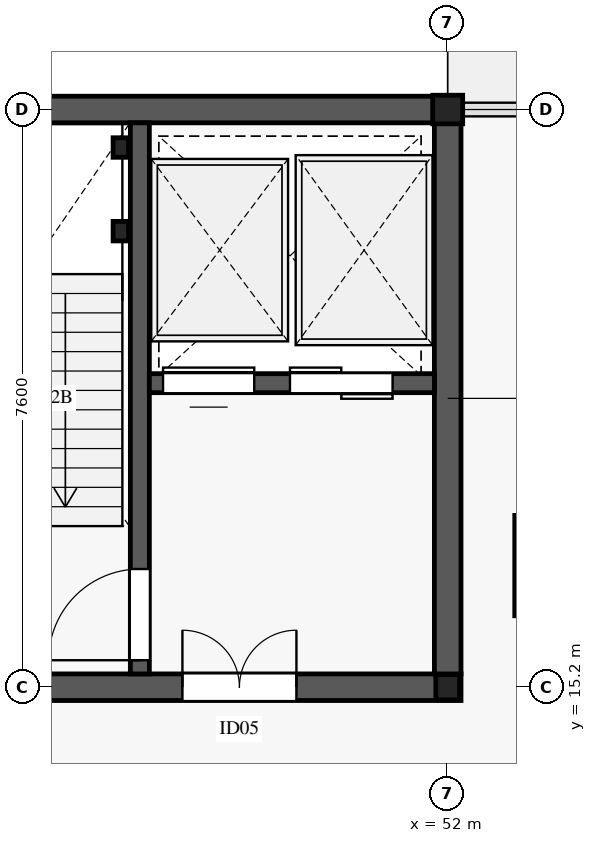
"""IFC4 building model, lengths in metres.
Left out: names, types, materials, properties, quantities, classifications, styles, units other than length and angle.
Written with IfcOpenShell. Run it as: python <this file> out.ifc"""

import sys

from ifc_helpers import new_model, si_unit, direction, frame, frame_2d, origin, origin_2d, place, context, subcontext, project, spatial, rectangle, i_section, extrude, element, fill, save


model = new_model("IFC4")
c1 = context("Model", 3, precision=1e-05, world=origin(), true_north=direction((0.0, 1.0)))
c2 = subcontext(c1, "Body", "Model", "MODEL_VIEW")
j1 = project(units=[si_unit("LENGTHUNIT", "METRE"), si_unit("PLANEANGLEUNIT", "RADIAN")], contexts=[c1])
p1 = place(None, origin())
s1 = spatial("IfcSite", under=j1, at=p1, CompositionType="ELEMENT")
p2 = place(p1, origin())
s2 = spatial("IfcBuilding", under=s1, at=p2, CompositionType="ELEMENT")
p3 = place(p2, frame((0.0, 0.0, 20.4)))
s3 = spatial("IfcBuildingStorey", under=s2, at=p3, CompositionType="ELEMENT", Elevation=20.4)
p4 = place(p3, frame((52.0, 15.2, 0.0), z_axis=(0.0, 0.0, 1.0), x_axis=(1.0, 0.0, 0.0)))
e1 = element("IfcColumn", 1, at=p4, inside=s3, PredefinedType="COLUMN", context=c2, shape_type="SweptSolid", body=[
    extrude(i_section(OverallWidth=0.313, OverallDepth=0.333, WebThickness=0.018, FlangeThickness=0.028, FilletRadius=0.015, at=origin_2d()), origin(), (0.0, 0.0, 1.0), 4.595),
])
p5 = place(p3, frame((52.0, 22.8, 0.0), z_axis=(0.0, 0.0, 1.0), x_axis=(1.0, 0.0, 0.0)))
e2 = element("IfcColumn", 2, at=p5, inside=s3, PredefinedType="COLUMN", context=c2, shape_type="SweptSolid", body=[
    extrude(i_section(OverallWidth=0.394, OverallDepth=0.376, WebThickness=0.017, FlangeThickness=0.028, FilletRadius=0.015, at=origin_2d()), origin(), (0.0, 0.0, 1.0), 4.595),
])
p6 = place(p3, frame((52.94, 17.46, 0.0), z_axis=(0.0, 0.0, 1.0), x_axis=(0.0, -1.0, 0.0)))
e3 = element("IfcWall", 3, at=p6, inside=s3, PredefinedType="PARTITIONING", context=c2, shape_type="SweptSolid", body=[
    extrude(rectangle(XDim=1.32, YDim=0.115, at=frame_2d((0.66, 0.0))), origin(), (0.0, 0.0, 1.0), 3.75),
])
p7 = place(p3, frame((43.825, 15.2, 0.0), z_axis=(0.0, 0.0, 1.0), x_axis=(1.0, 0.0, 0.0)))
e4 = element("IfcWall", 4, at=p7, inside=s3, PredefinedType="SHEAR", context=c2, shape_type="SweptSolid", body=[
    extrude(rectangle(XDim=8.35, YDim=0.35, at=frame_2d((4.175, 0.0))), origin(), (0.0, 0.0, 1.0), 4.59),
])
p8 = place(p7, frame((4.685, 0.0, 0.0)))
e5 = element("IfcOpeningElement", 5, at=p8, cuts=e4, PredefinedType="OPENING", context=c2, shape_type="SweptSolid", body=[
    extrude(rectangle(XDim=1.5, YDim=2.2, at=frame_2d((0.75, 1.1))), frame((0.0, 0.185, 0.0), z_axis=(0.0, -1.0, 0.0), x_axis=(1.0, 0.0, 0.0)), (0.0, 0.0, 1.0), 0.37),
])
p9 = place(p3, frame((43.825, 22.8, 0.0), z_axis=(0.0, 0.0, 1.0), x_axis=(1.0, 0.0, 0.0)))
e6 = element("IfcWall", 6, at=p9, inside=s3, PredefinedType="SHEAR", context=c2, shape_type="SweptSolid", body=[
    extrude(rectangle(XDim=8.35, YDim=0.35, at=frame_2d((4.175, 0.0))), origin(), (0.0, 0.0, 1.0), 4.59),
])
p10 = place(p3, frame((52.0, 15.375, 0.0), z_axis=(0.0, 0.0, 1.0), x_axis=(0.0, 1.0, 0.0)))
e7 = element("IfcWall", 7, at=p10, inside=s3, PredefinedType="SHEAR", context=c2, shape_type="SweptSolid", body=[
    extrude(rectangle(XDim=7.25, YDim=0.35, at=frame_2d((3.625, 0.0))), origin(), (0.0, 0.0, 1.0), 4.59),
])
p11 = place(p3, frame((47.95, 15.375, 0.0), z_axis=(0.0, 0.0, 1.0), x_axis=(0.0, 1.0, 0.0)))
e8 = element("IfcWall", 8, at=p11, inside=s3, PredefinedType="SHEAR", context=c2, shape_type="SweptSolid", body=[
    extrude(rectangle(XDim=7.25, YDim=0.25, at=frame_2d((3.625, 0.0))), origin(), (0.0, 0.0, 1.0), 4.59),
])
p12 = place(p11, frame((0.18, 0.0, 0.0)))
e9 = element("IfcOpeningElement", 9, at=p12, cuts=e8, PredefinedType="OPENING", context=c2, shape_type="SweptSolid", body=[
    extrude(rectangle(XDim=1.2, YDim=2.2, at=frame_2d((0.6, 1.1))), frame((0.0, 0.135, 0.0), z_axis=(0.0, -1.0, 0.0), x_axis=(1.0, 0.0, 0.0)), (0.0, 0.0, 1.0), 0.27),
])
p13 = place(p3, frame((48.075, 19.2, 0.0), z_axis=(0.0, 0.0, 1.0), x_axis=(1.0, 0.0, 0.0)))
e10 = element("IfcWall", 10, at=p13, inside=s3, PredefinedType="SHEAR", context=c2, shape_type="SweptSolid", body=[
    extrude(rectangle(XDim=3.75, YDim=0.25, at=frame_2d((1.875, 0.0))), origin(), (0.0, 0.0, 1.0), 4.59),
])
p14 = place(p13, frame((0.18, 0.0, 0.0)))
e11 = element("IfcOpeningElement", 11, at=p14, cuts=e10, PredefinedType="OPENING", context=c2, shape_type="SweptSolid", body=[
    extrude(rectangle(XDim=1.2, YDim=2.2, at=frame_2d((0.6, 1.1))), frame((0.0, 0.135, 0.0), z_axis=(0.0, -1.0, 0.0), x_axis=(1.0, 0.0, 0.0)), (0.0, 0.0, 1.0), 0.27),
])
p15 = place(p13, frame((1.85, 0.0, 0.0)))
e12 = element("IfcOpeningElement", 12, at=p15, cuts=e10, PredefinedType="OPENING", context=c2, shape_type="SweptSolid", body=[
    extrude(rectangle(XDim=1.35, YDim=2.2, at=frame_2d((0.675, 1.1))), frame((0.0, 0.135, 0.0), z_axis=(0.0, -1.0, 0.0), x_axis=(1.0, 0.0, 0.0)), (0.0, 0.0, 1.0), 0.27),
])
for number, where, z_axis, x_axis in (
    (13, (47.7, 21.2, 0.0), (0.0, 0.0, 1.0), (1.0, 0.0, 0.0)),
    (14, (47.7, 22.3, 0.0), (0.0, 0.0, 1.0), (1.0, 0.0, 0.0)),
):
    element("IfcColumn", number, at=place(p3, frame(where, z_axis=z_axis, x_axis=x_axis)), inside=s3, PredefinedType="COLUMN", context=c2, shape_type="SweptSolid", body=[
        extrude(i_section(OverallWidth=0.204, OverallDepth=0.257, WebThickness=0.009, FlangeThickness=0.016, FilletRadius=0.013, at=origin_2d()), origin(), (0.0, 0.0, 1.0), 4.795),
    ])
p16 = place(p12, origin())
e15 = element("IfcDoor", 15, at=p16, inside=s3, OperationType="SINGLE_SWING_LEFT", PredefinedType="DOOR", context=c2, shape_type="SweptSolid", body=[
    extrude(rectangle(XDim=1.2, YDim=2.2, at=frame_2d((0.6, 1.1))), frame((0.0, 0.025, 0.0), z_axis=(0.0, -1.0, 0.0), x_axis=(1.0, 0.0, 0.0)), (0.0, 0.0, 1.0), 0.05),
])
fill(e9, e15)
p17 = place(p8, origin())
e16 = element("IfcDoor", 16, at=p17, inside=s3, OperationType="DOUBLE_DOOR_SINGLE_SWING", PredefinedType="DOOR", context=c2, shape_type="SweptSolid", body=[
    extrude(rectangle(XDim=1.5, YDim=2.2, at=frame_2d((0.75, 1.1))), frame((0.0, 0.025, 0.0), z_axis=(0.0, -1.0, 0.0), x_axis=(1.0, 0.0, 0.0)), (0.0, 0.0, 1.0), 0.05),
])
fill(e5, e16)
p18 = place(p14, origin())
e17 = element("IfcDoor", 17, at=p18, inside=s3, OperationType="SLIDING_TO_LEFT", PredefinedType="DOOR", context=c2, shape_type="SweptSolid", body=[
    extrude(rectangle(XDim=1.2, YDim=2.2, at=frame_2d((0.6, 1.1))), frame((0.0, 0.025, 0.0), z_axis=(0.0, -1.0, 0.0), x_axis=(1.0, 0.0, 0.0)), (0.0, 0.0, 1.0), 0.05),
])
fill(e11, e17)
p19 = place(p15, origin())
e18 = element("IfcDoor", 18, at=p19, inside=s3, OperationType="DOUBLE_DOOR_SLIDING", PredefinedType="DOOR", context=c2, shape_type="SweptSolid", body=[
    extrude(rectangle(XDim=1.35, YDim=2.2, at=frame_2d((0.675, 1.1))), frame((0.0, 0.025, 0.0), z_axis=(0.0, -1.0, 0.0), x_axis=(1.0, 0.0, 0.0)), (0.0, 0.0, 1.0), 0.05),
])
fill(e12, e18)
save(model, sys.argv[1])
